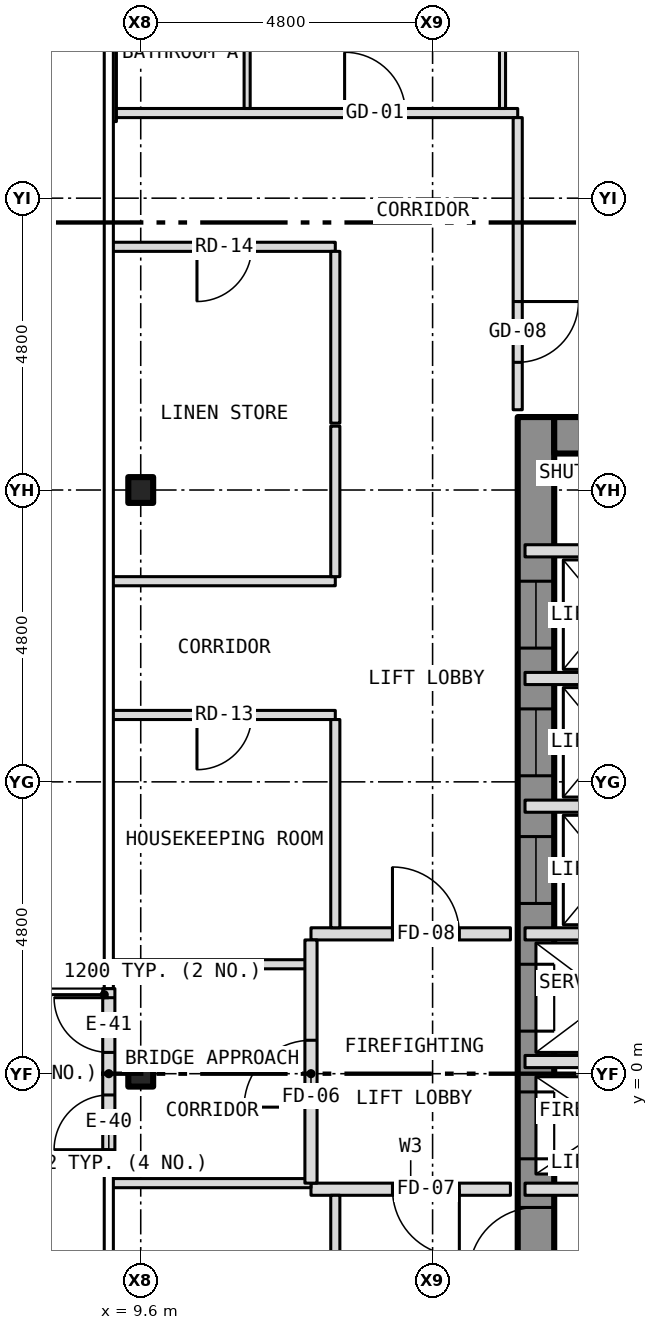
"""IFC4 building model, lengths in metres.
Left out: names, types, materials, properties, quantities, classifications, styles, units other than length and angle.
Written with IfcOpenShell. Run it as: python <this file> out.ifc"""

import sys

from ifc_helpers import new_model, si_unit, direction, frame, frame_2d, origin, origin_2d, place, context, subcontext, project, spatial, rectangle, i_section, extrude, element, fill, save


model = new_model("IFC4")
c1 = context("Model", 3, precision=1e-05, world=origin(), true_north=direction((0.0, 1.0)))
c2 = subcontext(c1, "Body", "Model", "MODEL_VIEW")
j1 = project(units=[si_unit("LENGTHUNIT", "METRE"), si_unit("PLANEANGLEUNIT", "RADIAN")], contexts=[c1])
p1 = place(None, origin())
s1 = spatial("IfcSite", under=j1, at=p1, CompositionType="ELEMENT")
p2 = place(p1, origin())
s2 = spatial("IfcBuilding", under=s1, at=p2, CompositionType="ELEMENT")
p3 = place(p2, frame((0.0, 0.0, 81.0)))
s3 = spatial("IfcBuildingStorey", under=s2, at=p3, CompositionType="ELEMENT", Elevation=81.0)
for number, where, z_axis, x_axis in (
    (1, (9.6, 0.0, -0.15), (0.0, 0.0, 1.0), (1.0, 0.0, 0.0)),
    (2, (9.6, 9.6, -0.15), (0.0, 0.0, 1.0), (1.0, 0.0, 0.0)),
):
    element("IfcColumn", number, at=place(p3, frame(where, z_axis=z_axis, x_axis=x_axis)), inside=s3, PredefinedType="COLUMN", context=c2, shape_type="SweptSolid", body=[
        extrude(i_section(OverallWidth=0.409, OverallDepth=0.424, WebThickness=0.033, FlangeThickness=0.052, at=origin_2d()), origin(), (0.0, 0.0, 1.0), 3.35),
    ])
p4 = place(p3, frame((16.1, -10.8, 0.0), z_axis=(0.0, 0.0, 1.0), x_axis=(0.0, 1.0, 0.0)))
e3 = element("IfcWall", 3, at=p4, inside=s3, PredefinedType="SHEAR", context=c2, shape_type="SweptSolid", body=[
    extrude(rectangle(XDim=21.6, YDim=0.6, at=frame_2d((10.8, 0.0))), origin(), (0.0, 0.0, 1.0), 2.9),
])
p5 = place(p4, frame((9.4, 0.0, 0.0)))
e4 = element("IfcOpeningElement", 4, at=p5, cuts=e3, PredefinedType="OPENING", context=c2, shape_type="SweptSolid", body=[
    extrude(rectangle(XDim=1.1, YDim=2.1, at=frame_2d((0.55, 1.05))), frame((0.0, 0.312, 0.0), z_axis=(0.0, -1.0, 0.0), x_axis=(1.0, 0.0, 0.0)), (0.0, 0.0, 1.0), 0.624),
])
p6 = place(p4, frame((11.5, 0.0, 0.0)))
e5 = element("IfcOpeningElement", 5, at=p6, cuts=e3, PredefinedType="OPENING", context=c2, shape_type="SweptSolid", body=[
    extrude(rectangle(XDim=1.1, YDim=2.1, at=frame_2d((0.55, 1.05))), frame((0.0, 0.312, 0.0), z_axis=(0.0, -1.0, 0.0), x_axis=(1.0, 0.0, 0.0)), (0.0, 0.0, 1.0), 0.624),
])
p7 = place(p4, frame((13.6, 0.0, 0.0)))
e6 = element("IfcOpeningElement", 6, at=p7, cuts=e3, PredefinedType="OPENING", context=c2, shape_type="SweptSolid", body=[
    extrude(rectangle(XDim=1.1, YDim=2.1, at=frame_2d((0.55, 1.05))), frame((0.0, 0.312, 0.0), z_axis=(0.0, -1.0, 0.0), x_axis=(1.0, 0.0, 0.0)), (0.0, 0.0, 1.0), 0.624),
])
p8 = place(p4, frame((15.7, 0.0, 0.0)))
e7 = element("IfcOpeningElement", 7, at=p8, cuts=e3, PredefinedType="OPENING", context=c2, shape_type="SweptSolid", body=[
    extrude(rectangle(XDim=1.1, YDim=2.1, at=frame_2d((0.55, 1.05))), frame((0.0, 0.312, 0.0), z_axis=(0.0, -1.0, 0.0), x_axis=(1.0, 0.0, 0.0)), (0.0, 0.0, 1.0), 0.624),
])
p9 = place(p4, frame((17.8, 0.0, 0.0)))
e8 = element("IfcOpeningElement", 8, at=p9, cuts=e3, PredefinedType="OPENING", context=c2, shape_type="SweptSolid", body=[
    extrude(rectangle(XDim=1.1, YDim=2.1, at=frame_2d((0.55, 1.05))), frame((0.0, 0.312, 0.0), z_axis=(0.0, -1.0, 0.0), x_axis=(1.0, 0.0, 0.0)), (0.0, 0.0, 1.0), 0.624),
])
p10 = place(p4, frame((5.642, 0.0, 0.0)))
e9 = element("IfcOpeningElement", 9, at=p10, cuts=e3, PredefinedType="OPENING", context=c2, shape_type="SweptSolid", body=[
    extrude(rectangle(XDim=1.1, YDim=2.1, at=frame_2d((0.55, 1.05))), frame((0.0, 0.312, 0.0), z_axis=(0.0, -1.0, 0.0), x_axis=(1.0, 0.0, 0.0)), (0.0, 0.0, 1.0), 0.624),
])
p11 = place(p4, frame((7.5, 0.0, 0.0)))
e10 = element("IfcOpeningElement", 10, at=p11, cuts=e3, PredefinedType="OPENING", context=c2, shape_type="SweptSolid", body=[
    extrude(rectangle(XDim=1.1, YDim=2.1, at=frame_2d((0.55, 1.05))), frame((0.0, 0.312, 0.0), z_axis=(0.0, -1.0, 0.0), x_axis=(1.0, 0.0, 0.0)), (0.0, 0.0, 1.0), 0.624),
])
p12 = place(p3, frame((16.4, 10.5, 0.0), z_axis=(0.0, 0.0, 1.0), x_axis=(1.0, 0.0, 0.0)))
e11 = element("IfcWall", 11, at=p12, inside=s3, PredefinedType="SHEAR", context=c2, shape_type="SweptSolid", body=[
    extrude(rectangle(XDim=7.0, YDim=0.6, at=frame_2d((3.5, 0.0))), origin(), (0.0, 0.0, 1.0), 2.9),
])
p13 = place(p3, frame((9.075, -1.4, 0.0), z_axis=(0.0, 0.0, 1.0), x_axis=(0.0, 1.0, 0.0)))
e12 = element("IfcWall", 12, at=p13, inside=s3, PredefinedType="SOLIDWALL", context=c2, shape_type="SweptSolid", body=[
    extrude(rectangle(XDim=2.8, YDim=0.2, at=frame_2d((1.4, 0.0))), origin(), (0.0, 0.0, 1.0), 3.5),
])
p14 = place(p13, frame((0.15, 0.0, 0.0)))
e13 = element("IfcOpeningElement", 13, at=p14, cuts=e12, PredefinedType="OPENING", context=c2, shape_type="SweptSolid", body=[
    extrude(rectangle(XDim=0.9, YDim=2.1, at=frame_2d((0.45, 1.05))), frame((0.0, 0.112, 0.0), z_axis=(0.0, -1.0, 0.0), x_axis=(1.0, 0.0, 0.0)), (0.0, 0.0, 1.0), 0.224),
])
p15 = place(p13, frame((1.75, 0.0, 0.0)))
e14 = element("IfcOpeningElement", 14, at=p15, cuts=e12, PredefinedType="OPENING", context=c2, shape_type="SweptSolid", body=[
    extrude(rectangle(XDim=0.9, YDim=2.1, at=frame_2d((0.45, 1.05))), frame((0.0, 0.112, 0.0), z_axis=(0.0, -1.0, 0.0), x_axis=(1.0, 0.0, 0.0)), (0.0, 0.0, 1.0), 0.224),
])
p16 = place(p3, frame((12.4, -1.9, 0.0), z_axis=(0.0, 0.0, 1.0), x_axis=(1.0, 0.0, 0.0)))
e15 = element("IfcWall", 15, at=p16, inside=s3, PredefinedType="PARTITIONING", context=c2, shape_type="SweptSolid", body=[
    extrude(rectangle(XDim=3.28, YDim=0.2, at=frame_2d((1.64, 0.0))), origin(), (0.0, 0.0, 1.0), 3.2),
])
p17 = place(p16, frame((1.34, 0.0, 0.0)))
e16 = element("IfcOpeningElement", 16, at=p17, cuts=e15, PredefinedType="OPENING", context=c2, shape_type="SweptSolid", body=[
    extrude(rectangle(XDim=1.1, YDim=2.1, at=frame_2d((0.55, 1.05))), frame((0.0, 0.112, 0.0), z_axis=(0.0, -1.0, 0.0), x_axis=(1.0, 0.0, 0.0)), (0.0, 0.0, 1.0), 0.224),
])
p18 = place(p3, frame((15.92, -1.9, 0.0), z_axis=(0.0, 0.0, 1.0), x_axis=(1.0, 0.0, 0.0)))
e17 = element("IfcWall", 17, at=p18, inside=s3, PredefinedType="PARTITIONING", context=c2, shape_type="SweptSolid", body=[
    extrude(rectangle(XDim=7.96, YDim=0.2, at=frame_2d((3.98, 0.0))), origin(), (0.0, 0.0, 1.0), 2.9),
])
p19 = place(p18, frame((3.74, 0.0, 0.0)))
e18 = element("IfcOpeningElement", 18, at=p19, cuts=e17, PredefinedType="OPENING", context=c2, shape_type="SweptSolid", body=[
    extrude(rectangle(XDim=0.9, YDim=2.1, at=frame_2d((0.45, 1.05))), frame((0.0, 0.112, 0.0), z_axis=(0.0, -1.0, 0.0), x_axis=(1.0, 0.0, 0.0)), (0.0, 0.0, 1.0), 0.224),
])
p20 = place(p3, frame((9.12, -1.8, 0.0), z_axis=(0.0, 0.0, 1.0), x_axis=(1.0, 0.0, 0.0)))
e19 = element("IfcWall", 19, at=p20, inside=s3, PredefinedType="PARTITIONING", context=c2, shape_type="SweptSolid", body=[
    extrude(rectangle(XDim=3.28, YDim=0.15, at=frame_2d((1.64, 0.0))), origin(), (0.0, 0.0, 1.0), 3.2),
])
p21 = place(p3, frame((15.92, 0.2, 0.0), z_axis=(0.0, 0.0, 1.0), x_axis=(1.0, 0.0, 0.0)))
e20 = element("IfcWall", 20, at=p21, inside=s3, PredefinedType="PARTITIONING", context=c2, shape_type="SweptSolid", body=[
    extrude(rectangle(XDim=2.88, YDim=0.2, at=frame_2d((1.44, 0.0))), origin(), (0.0, 0.0, 1.0), 2.9),
])
p22 = place(p3, frame((9.12, 1.8, 0.0), z_axis=(0.0, 0.0, 1.0), x_axis=(1.0, 0.0, 0.0)))
e21 = element("IfcWall", 21, at=p22, inside=s3, PredefinedType="PARTITIONING", context=c2, shape_type="SweptSolid", body=[
    extrude(rectangle(XDim=3.28, YDim=0.15, at=frame_2d((1.64, 0.0))), origin(), (0.0, 0.0, 1.0), 3.2),
])
p23 = place(p3, frame((12.4, 2.3, 0.0), z_axis=(0.0, 0.0, 1.0), x_axis=(1.0, 0.0, 0.0)))
e22 = element("IfcWall", 22, at=p23, inside=s3, PredefinedType="PARTITIONING", context=c2, shape_type="SweptSolid", body=[
    extrude(rectangle(XDim=3.28, YDim=0.2, at=frame_2d((1.64, 0.0))), origin(), (0.0, 0.0, 1.0), 3.2),
])
p24 = place(p23, frame((1.34, 0.0, 0.0)))
e23 = element("IfcOpeningElement", 23, at=p24, cuts=e22, PredefinedType="OPENING", context=c2, shape_type="SweptSolid", body=[
    extrude(rectangle(XDim=1.1, YDim=2.1, at=frame_2d((0.55, 1.05))), frame((0.0, 0.112, 0.0), z_axis=(0.0, -1.0, 0.0), x_axis=(1.0, 0.0, 0.0)), (0.0, 0.0, 1.0), 0.224),
])
for number, where, z_axis, x_axis in (
    (24, (15.92, 2.3, 0.0), (0.0, 0.0, 1.0), (1.0, 0.0, 0.0)),
    (25, (15.92, 4.4, 0.0), (0.0, 0.0, 1.0), (1.0, 0.0, 0.0)),
):
    element("IfcWall", number, at=place(p3, frame(where, z_axis=z_axis, x_axis=x_axis)), inside=s3, PredefinedType="PARTITIONING", context=c2, shape_type="SweptSolid", body=[
        extrude(rectangle(XDim=2.88, YDim=0.2, at=frame_2d((1.44, 0.0))), origin(), (0.0, 0.0, 1.0), 2.9),
    ])
p25 = place(p3, frame((9.12, 5.9, 0.0), z_axis=(0.0, 0.0, 1.0), x_axis=(1.0, 0.0, 0.0)))
e26 = element("IfcWall", 26, at=p25, inside=s3, PredefinedType="PARTITIONING", context=c2, shape_type="SweptSolid", body=[
    extrude(rectangle(XDim=3.68, YDim=0.15, at=frame_2d((1.84, 0.0))), origin(), (0.0, 0.0, 1.0), 3.2),
])
p26 = place(p25, frame((1.405, 0.0, 0.0)))
e27 = element("IfcOpeningElement", 27, at=p26, cuts=e26, PredefinedType="OPENING", context=c2, shape_type="SweptSolid", body=[
    extrude(rectangle(XDim=0.9, YDim=2.1, at=frame_2d((0.45, 1.05))), frame((0.0, 0.087, 0.0), z_axis=(0.0, -1.0, 0.0), x_axis=(1.0, 0.0, 0.0)), (0.0, 0.0, 1.0), 0.174),
])
p27 = place(p3, frame((15.92, 6.5, 0.0), z_axis=(0.0, 0.0, 1.0), x_axis=(1.0, 0.0, 0.0)))
e28 = element("IfcWall", 28, at=p27, inside=s3, PredefinedType="PARTITIONING", context=c2, shape_type="SweptSolid", body=[
    extrude(rectangle(XDim=2.88, YDim=0.2, at=frame_2d((1.44, 0.0))), origin(), (0.0, 0.0, 1.0), 2.9),
])
p28 = place(p3, frame((9.12, 8.1, 0.0), z_axis=(0.0, 0.0, 1.0), x_axis=(1.0, 0.0, 0.0)))
e29 = element("IfcWall", 29, at=p28, inside=s3, PredefinedType="PARTITIONING", context=c2, shape_type="SweptSolid", body=[
    extrude(rectangle(XDim=3.68, YDim=0.15, at=frame_2d((1.84, 0.0))), origin(), (0.0, 0.0, 1.0), 3.2),
])
p29 = place(p3, frame((15.92, 8.6, 0.0), z_axis=(0.0, 0.0, 1.0), x_axis=(1.0, 0.0, 0.0)))
e30 = element("IfcWall", 30, at=p29, inside=s3, PredefinedType="PARTITIONING", context=c2, shape_type="SweptSolid", body=[
    extrude(rectangle(XDim=2.88, YDim=0.2, at=frame_2d((1.44, 0.0))), origin(), (0.0, 0.0, 1.0), 2.9),
])
p30 = place(p3, frame((9.12, 13.6, 0.0), z_axis=(0.0, 0.0, 1.0), x_axis=(1.0, 0.0, 0.0)))
e31 = element("IfcWall", 31, at=p30, inside=s3, PredefinedType="PARTITIONING", context=c2, shape_type="SweptSolid", body=[
    extrude(rectangle(XDim=3.68, YDim=0.15, at=frame_2d((1.84, 0.0))), origin(), (0.0, 0.0, 1.0), 3.2),
])
p31 = place(p30, frame((1.405, 0.0, 0.0)))
e32 = element("IfcOpeningElement", 32, at=p31, cuts=e31, PredefinedType="OPENING", context=c2, shape_type="SweptSolid", body=[
    extrude(rectangle(XDim=0.9, YDim=2.1, at=frame_2d((0.45, 1.05))), frame((0.0, 0.087, 0.0), z_axis=(0.0, -1.0, 0.0), x_axis=(1.0, 0.0, 0.0)), (0.0, 0.0, 1.0), 0.174),
])
p32 = place(p3, frame((9.15, 15.8, 0.0), z_axis=(0.0, 0.0, 1.0), x_axis=(1.0, 0.0, 0.0)))
e33 = element("IfcWall", 33, at=p32, inside=s3, PredefinedType="PARTITIONING", context=c2, shape_type="SweptSolid", body=[
    extrude(rectangle(XDim=6.65, YDim=0.15, at=frame_2d((3.325, 0.0))), origin(), (0.0, 0.0, 1.0), 3.2),
])
p33 = place(p32, frame((3.803, 0.0, 0.0)))
e34 = element("IfcOpeningElement", 34, at=p33, cuts=e33, PredefinedType="OPENING", context=c2, shape_type="SweptSolid", body=[
    extrude(rectangle(XDim=1.0, YDim=2.1, at=frame_2d((0.5, 1.05))), frame((0.0, 0.087, 0.0), z_axis=(0.0, -1.0, 0.0), x_axis=(1.0, 0.0, 0.0)), (0.0, 0.0, 1.0), 0.174),
])
p34 = place(p3, frame((9.15, 15.66, 0.0), z_axis=(0.0, 0.0, 1.0), x_axis=(0.0, 1.0, 0.0)))
e35 = element("IfcWall", 35, at=p34, inside=s3, PredefinedType="PARTITIONING", context=c2, shape_type="SweptSolid", body=[
    extrude(rectangle(XDim=3.48, YDim=0.1, at=frame_2d((1.74, 0.0))), origin(), (0.0, 0.0, 1.0), 3.2),
])
p35 = place(p3, frame((11.35, 15.875, 0.0), z_axis=(0.0, 0.0, 1.0), x_axis=(0.0, 1.0, 0.0)))
e36 = element("IfcWall", 36, at=p35, inside=s3, PredefinedType="PARTITIONING", context=c2, shape_type="SweptSolid", body=[
    extrude(rectangle(XDim=3.075, YDim=0.1, at=frame_2d((1.538, 0.0))), origin(), (0.0, 0.0, 1.0), 3.2),
])
p36 = place(p35, frame((1.971, 0.0, 0.0)))
e37 = element("IfcOpeningElement", 37, at=p36, cuts=e36, PredefinedType="OPENING", context=c2, shape_type="SweptSolid", body=[
    extrude(rectangle(XDim=0.9, YDim=2.1, at=frame_2d((0.45, 1.05))), frame((0.0, 0.062, 0.0), z_axis=(0.0, -1.0, 0.0), x_axis=(1.0, 0.0, 0.0)), (0.0, 0.0, 1.0), 0.124),
])
p37 = place(p3, frame((12.4, -1.8, 0.0), z_axis=(0.0, 0.0, 1.0), x_axis=(0.0, 1.0, 0.0)))
e38 = element("IfcWall", 38, at=p37, inside=s3, PredefinedType="PARTITIONING", context=c2, shape_type="SweptSolid", body=[
    extrude(rectangle(XDim=4.0, YDim=0.2, at=frame_2d((2.0, 0.0))), origin(), (0.0, 0.0, 1.0), 3.2),
])
p38 = place(p37, frame((1.25, 0.0, 0.0)))
e39 = element("IfcOpeningElement", 39, at=p38, cuts=e38, PredefinedType="OPENING", context=c2, shape_type="SweptSolid", body=[
    extrude(rectangle(XDim=1.1, YDim=2.1, at=frame_2d((0.55, 1.05))), frame((0.0, 0.112, 0.0), z_axis=(0.0, -1.0, 0.0), x_axis=(1.0, 0.0, 0.0)), (0.0, 0.0, 1.0), 0.224),
])
p39 = place(p3, frame((12.8, -13.525, 0.0), z_axis=(0.0, 0.0, 1.0), x_axis=(0.0, 1.0, 0.0)))
e40 = element("IfcWall", 40, at=p39, inside=s3, PredefinedType="PARTITIONING", context=c2, shape_type="SweptSolid", body=[
    extrude(rectangle(XDim=11.525, YDim=0.15, at=frame_2d((5.762, 0.0))), origin(), (0.0, 0.0, 1.0), 3.2),
])
p40 = place(p39, frame((6.725, 0.0, 0.0)))
e41 = element("IfcOpeningElement", 41, at=p40, cuts=e40, PredefinedType="OPENING", context=c2, shape_type="SweptSolid", body=[
    extrude(rectangle(XDim=0.9, YDim=2.1, at=frame_2d((0.45, 1.05))), frame((0.0, 0.087, 0.0), z_axis=(0.0, -1.0, 0.0), x_axis=(1.0, 0.0, 0.0)), (0.0, 0.0, 1.0), 0.174),
])
p41 = place(p3, frame((12.8, 2.4, 0.0), z_axis=(0.0, 0.0, 1.0), x_axis=(0.0, 1.0, 0.0)))
e42 = element("IfcWall", 42, at=p41, inside=s3, PredefinedType="PARTITIONING", context=c2, shape_type="SweptSolid", body=[
    extrude(rectangle(XDim=3.425, YDim=0.15, at=frame_2d((1.712, 0.0))), origin(), (0.0, 0.0, 1.0), 3.2),
])
p42 = place(p3, frame((12.8, 8.175, 0.0), z_axis=(0.0, 0.0, 1.0), x_axis=(0.0, 1.0, 0.0)))
e43 = element("IfcWall", 43, at=p42, inside=s3, PredefinedType="PARTITIONING", context=c2, shape_type="SweptSolid", body=[
    extrude(rectangle(XDim=2.475, YDim=0.15, at=frame_2d((1.237, 0.0))), origin(), (0.0, 0.0, 1.0), 3.2),
])
p43 = place(p3, frame((12.8, 10.7, 0.0), z_axis=(0.0, 0.0, 1.0), x_axis=(0.0, 1.0, 0.0)))
e44 = element("IfcWall", 44, at=p43, inside=s3, PredefinedType="PARTITIONING", context=c2, shape_type="SweptSolid", body=[
    extrude(rectangle(XDim=2.825, YDim=0.15, at=frame_2d((1.413, 0.0))), origin(), (0.0, 0.0, 1.0), 3.2),
])
p44 = place(p3, frame((15.55, 15.875, 0.0), z_axis=(0.0, 0.0, 1.0), x_axis=(0.0, 1.0, 0.0)))
e45 = element("IfcWall", 45, at=p44, inside=s3, PredefinedType="PARTITIONING", context=c2, shape_type="SweptSolid", body=[
    extrude(rectangle(XDim=8.005, YDim=0.1, at=frame_2d((4.002, 0.0))), origin(), (0.0, 0.0, 1.0), 3.2),
])
p45 = place(p3, frame((15.8, 10.92, 0.0), z_axis=(0.0, 0.0, 1.0), x_axis=(0.0, 1.0, 0.0)))
e46 = element("IfcWall", 46, at=p45, inside=s3, PredefinedType="PARTITIONING", context=c2, shape_type="SweptSolid", body=[
    extrude(rectangle(XDim=4.805, YDim=0.15, at=frame_2d((2.403, 0.0))), origin(), (0.0, 0.0, 1.0), 3.2),
])
p46 = place(p45, frame((0.78, 0.0, 0.0)))
e47 = element("IfcOpeningElement", 47, at=p46, cuts=e46, PredefinedType="OPENING", context=c2, shape_type="SweptSolid", body=[
    extrude(rectangle(XDim=1.0, YDim=2.1, at=frame_2d((0.5, 1.05))), frame((0.0, 0.087, 0.0), z_axis=(0.0, -1.0, 0.0), x_axis=(1.0, 0.0, 0.0)), (0.0, 0.0, 1.0), 0.174),
])
p47 = place(p14, origin())
e48 = element("IfcDoor", 48, at=p47, inside=s3, OperationType="SINGLE_SWING_LEFT", PredefinedType="DOOR", context=c2, shape_type="SweptSolid", body=[
    extrude(rectangle(XDim=0.9, YDim=2.1, at=frame_2d((0.45, 1.05))), frame((0.0, 0.025, 0.0), z_axis=(0.0, -1.0, 0.0), x_axis=(1.0, 0.0, 0.0)), (0.0, 0.0, 1.0), 0.05),
])
fill(e13, e48)
p48 = place(p15, origin())
e49 = element("IfcDoor", 49, at=p48, inside=s3, OperationType="SINGLE_SWING_RIGHT", PredefinedType="DOOR", context=c2, shape_type="SweptSolid", body=[
    extrude(rectangle(XDim=0.9, YDim=2.1, at=frame_2d((0.45, 1.05))), frame((0.0, 0.025, 0.0), z_axis=(0.0, -1.0, 0.0), x_axis=(1.0, 0.0, 0.0)), (0.0, 0.0, 1.0), 0.05),
])
fill(e14, e49)
p49 = place(p5, origin())
e50 = element("IfcDoor", 50, at=p49, inside=s3, OperationType="SLIDING_TO_LEFT", PredefinedType="DOOR", context=c2, shape_type="SweptSolid", body=[
    extrude(rectangle(XDim=1.1, YDim=2.1, at=frame_2d((0.55, 1.05))), frame((0.0, 0.025, 0.0), z_axis=(0.0, -1.0, 0.0), x_axis=(1.0, 0.0, 0.0)), (0.0, 0.0, 1.0), 0.05),
])
fill(e4, e50)
p50 = place(p6, origin())
e51 = element("IfcDoor", 51, at=p50, inside=s3, OperationType="SLIDING_TO_LEFT", PredefinedType="DOOR", context=c2, shape_type="SweptSolid", body=[
    extrude(rectangle(XDim=1.1, YDim=2.1, at=frame_2d((0.55, 1.05))), frame((0.0, 0.025, 0.0), z_axis=(0.0, -1.0, 0.0), x_axis=(1.0, 0.0, 0.0)), (0.0, 0.0, 1.0), 0.05),
])
fill(e5, e51)
p51 = place(p7, origin())
e52 = element("IfcDoor", 52, at=p51, inside=s3, OperationType="SLIDING_TO_LEFT", PredefinedType="DOOR", context=c2, shape_type="SweptSolid", body=[
    extrude(rectangle(XDim=1.1, YDim=2.1, at=frame_2d((0.55, 1.05))), frame((0.0, 0.025, 0.0), z_axis=(0.0, -1.0, 0.0), x_axis=(1.0, 0.0, 0.0)), (0.0, 0.0, 1.0), 0.05),
])
fill(e6, e52)
p52 = place(p8, origin())
e53 = element("IfcDoor", 53, at=p52, inside=s3, OperationType="SLIDING_TO_LEFT", PredefinedType="DOOR", context=c2, shape_type="SweptSolid", body=[
    extrude(rectangle(XDim=1.1, YDim=2.1, at=frame_2d((0.55, 1.05))), frame((0.0, 0.025, 0.0), z_axis=(0.0, -1.0, 0.0), x_axis=(1.0, 0.0, 0.0)), (0.0, 0.0, 1.0), 0.05),
])
fill(e7, e53)
p53 = place(p9, origin())
e54 = element("IfcDoor", 54, at=p53, inside=s3, OperationType="SLIDING_TO_LEFT", PredefinedType="DOOR", context=c2, shape_type="SweptSolid", body=[
    extrude(rectangle(XDim=1.1, YDim=2.1, at=frame_2d((0.55, 1.05))), frame((0.0, 0.025, 0.0), z_axis=(0.0, -1.0, 0.0), x_axis=(1.0, 0.0, 0.0)), (0.0, 0.0, 1.0), 0.05),
])
fill(e8, e54)
p54 = place(p11, origin())
e55 = element("IfcDoor", 55, at=p54, inside=s3, OperationType="SINGLE_SWING_LEFT", PredefinedType="DOOR", context=c2, shape_type="SweptSolid", body=[
    extrude(rectangle(XDim=1.1, YDim=2.1, at=frame_2d((0.55, 1.05))), frame((0.0, 0.025, 0.0), z_axis=(0.0, -1.0, 0.0), x_axis=(1.0, 0.0, 0.0)), (0.0, 0.0, 1.0), 0.05),
])
fill(e10, e55)
p55 = place(p38, origin())
e56 = element("IfcDoor", 56, at=p55, inside=s3, OperationType="SINGLE_SWING_LEFT", PredefinedType="DOOR", context=c2, shape_type="SweptSolid", body=[
    extrude(rectangle(XDim=1.1, YDim=2.1, at=frame_2d((0.55, 1.05))), frame((0.0, 0.025, 0.0), z_axis=(0.0, -1.0, 0.0), x_axis=(1.0, 0.0, 0.0)), (0.0, 0.0, 1.0), 0.05),
])
fill(e39, e56)
p56 = place(p17, origin())
e57 = element("IfcDoor", 57, at=p56, inside=s3, OperationType="SINGLE_SWING_RIGHT", PredefinedType="DOOR", context=c2, shape_type="SweptSolid", body=[
    extrude(rectangle(XDim=1.1, YDim=2.1, at=frame_2d((0.55, 1.05))), frame((0.0, 0.025, 0.0), z_axis=(0.0, -1.0, 0.0), x_axis=(1.0, 0.0, 0.0)), (0.0, 0.0, 1.0), 0.05),
])
fill(e16, e57)
p57 = place(p24, origin())
e58 = element("IfcDoor", 58, at=p57, inside=s3, OperationType="SINGLE_SWING_LEFT", PredefinedType="DOOR", context=c2, shape_type="SweptSolid", body=[
    extrude(rectangle(XDim=1.1, YDim=2.1, at=frame_2d((0.55, 1.05))), frame((0.0, 0.025, 0.0), z_axis=(0.0, -1.0, 0.0), x_axis=(1.0, 0.0, 0.0)), (0.0, 0.0, 1.0), 0.05),
])
fill(e23, e58)
p58 = place(p33, origin())
e59 = element("IfcDoor", 59, at=p58, inside=s3, OperationType="SINGLE_SWING_LEFT", PredefinedType="DOOR", context=c2, shape_type="SweptSolid", body=[
    extrude(rectangle(XDim=1.0, YDim=2.1, at=frame_2d((0.5, 1.05))), frame((0.0, 0.025, 0.0), z_axis=(0.0, -1.0, 0.0), x_axis=(1.0, 0.0, 0.0)), (0.0, 0.0, 1.0), 0.05),
])
fill(e34, e59)
p59 = place(p46, origin())
e60 = element("IfcDoor", 60, at=p59, inside=s3, OperationType="SINGLE_SWING_RIGHT", PredefinedType="DOOR", context=c2, shape_type="SweptSolid", body=[
    extrude(rectangle(XDim=1.0, YDim=2.1, at=frame_2d((0.5, 1.05))), frame((0.0, 0.025, 0.0), z_axis=(0.0, -1.0, 0.0), x_axis=(1.0, 0.0, 0.0)), (0.0, 0.0, 1.0), 0.05),
])
fill(e47, e60)
p60 = place(p26, origin())
e61 = element("IfcDoor", 61, at=p60, inside=s3, OperationType="SINGLE_SWING_LEFT", PredefinedType="DOOR", context=c2, shape_type="SweptSolid", body=[
    extrude(rectangle(XDim=0.9, YDim=2.1, at=frame_2d((0.45, 1.05))), frame((0.0, 0.025, 0.0), z_axis=(0.0, -1.0, 0.0), x_axis=(1.0, 0.0, 0.0)), (0.0, 0.0, 1.0), 0.05),
])
fill(e27, e61)
p61 = place(p31, origin())
e62 = element("IfcDoor", 62, at=p61, inside=s3, OperationType="SINGLE_SWING_LEFT", PredefinedType="DOOR", context=c2, shape_type="SweptSolid", body=[
    extrude(rectangle(XDim=0.9, YDim=2.1, at=frame_2d((0.45, 1.05))), frame((0.0, 0.025, 0.0), z_axis=(0.0, -1.0, 0.0), x_axis=(1.0, 0.0, 0.0)), (0.0, 0.0, 1.0), 0.05),
])
fill(e32, e62)
save(model, sys.argv[1])
